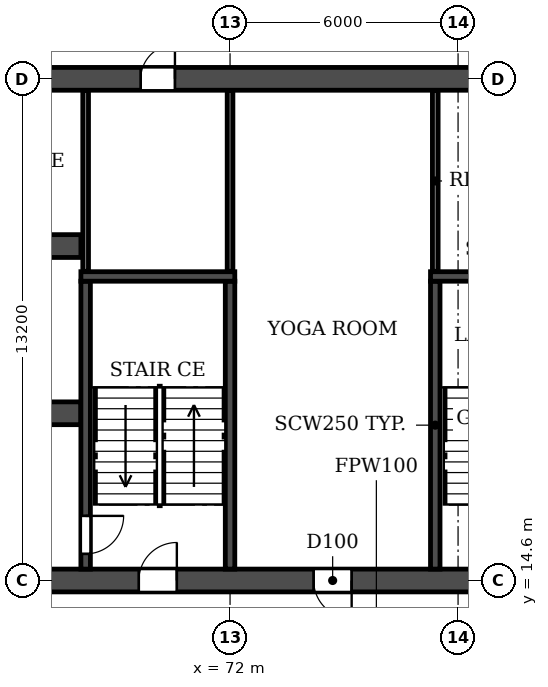
"""IFC4 building model, lengths in metres.
Left out: names, types, materials, properties, quantities, classifications, styles, units other than length and angle.
Written with IfcOpenShell. Run it as: python <this file> out.ifc"""

import sys

from ifc_helpers import new_model, si_unit, direction, frame, frame_2d, origin, place, context, subcontext, project, spatial, rectangle, extrude, element, fill, save


model = new_model("IFC4")
c1 = context("Model", 3, precision=1e-05, world=origin(), true_north=direction((0.0, 1.0)))
c2 = subcontext(c1, "Body", "Model", "MODEL_VIEW")
j1 = project(units=[si_unit("LENGTHUNIT", "METRE"), si_unit("PLANEANGLEUNIT", "RADIAN")], contexts=[c1])
p1 = place(None, origin())
s1 = spatial("IfcSite", under=j1, at=p1, CompositionType="ELEMENT")
p2 = place(p1, origin())
s2 = spatial("IfcBuilding", under=s1, at=p2, CompositionType="ELEMENT")
p3 = place(p2, frame((0.0, 0.0, 49.8)))
s3 = spatial("IfcBuildingStorey", under=s2, at=p3, CompositionType="ELEMENT", Elevation=49.8)
p4 = place(p3, frame((2.6, 14.6, 0.0), z_axis=(0.0, 0.0, 1.0), x_axis=(1.0, 0.0, 0.0)))
e1 = element("IfcWall", 1, at=p4, inside=s3, PredefinedType="SOLIDWALL", context=c2, shape_type="SweptSolid", body=[
    extrude(rectangle(XDim=96.8, YDim=0.6, at=frame_2d((48.4, 0.0))), origin(), (0.0, 0.0, 1.0), 3.0),
])
p5 = place(p4, frame((3.05, 0.0, 0.0)))
e2 = element("IfcOpeningElement", 2, at=p5, cuts=e1, PredefinedType="OPENING", context=c2, shape_type="SweptSolid", body=[
    extrude(rectangle(XDim=1.5, YDim=2.1, at=frame_2d((0.75, 1.05))), frame((0.0, 0.31, 0.0), z_axis=(0.0, -1.0, 0.0), x_axis=(1.0, 0.0, 0.0)), (0.0, 0.0, 1.0), 0.62),
])
p6 = place(p4, frame((10.75, 0.0, 0.0)))
e3 = element("IfcOpeningElement", 3, at=p6, cuts=e1, PredefinedType="OPENING", context=c2, shape_type="SweptSolid", body=[
    extrude(rectangle(XDim=1.5, YDim=2.1, at=frame_2d((0.75, 1.05))), frame((0.0, 0.31, 0.0), z_axis=(0.0, -1.0, 0.0), x_axis=(1.0, 0.0, 0.0)), (0.0, 0.0, 1.0), 0.62),
])
p7 = place(p4, frame((16.3, 0.0, 0.0)))
e4 = element("IfcOpeningElement", 4, at=p7, cuts=e1, PredefinedType="OPENING", context=c2, shape_type="SweptSolid", body=[
    extrude(rectangle(XDim=1.0, YDim=2.1, at=frame_2d((0.5, 1.05))), frame((0.0, 0.31, 0.0), z_axis=(0.0, -1.0, 0.0), x_axis=(1.0, 0.0, 0.0)), (0.0, 0.0, 1.0), 0.62),
])
p8 = place(p4, frame((24.2, 0.0, 0.0)))
e5 = element("IfcOpeningElement", 5, at=p8, cuts=e1, PredefinedType="OPENING", context=c2, shape_type="SweptSolid", body=[
    extrude(rectangle(XDim=1.0, YDim=2.1, at=frame_2d((0.5, 1.05))), frame((0.0, 0.31, 0.0), z_axis=(0.0, -1.0, 0.0), x_axis=(1.0, 0.0, 0.0)), (0.0, 0.0, 1.0), 0.62),
])
p9 = place(p4, frame((28.8, 0.0, 0.0)))
e6 = element("IfcOpeningElement", 6, at=p9, cuts=e1, PredefinedType="OPENING", context=c2, shape_type="SweptSolid", body=[
    extrude(rectangle(XDim=1.0, YDim=2.1, at=frame_2d((0.5, 1.05))), frame((0.0, 0.31, 0.0), z_axis=(0.0, -1.0, 0.0), x_axis=(1.0, 0.0, 0.0)), (0.0, 0.0, 1.0), 0.62),
])
p10 = place(p4, frame((42.7, 0.0, 0.0)))
e7 = element("IfcOpeningElement", 7, at=p10, cuts=e1, PredefinedType="OPENING", context=c2, shape_type="SweptSolid", body=[
    extrude(rectangle(XDim=1.0, YDim=2.1, at=frame_2d((0.5, 1.05))), frame((0.0, 0.31, 0.0), z_axis=(0.0, -1.0, 0.0), x_axis=(1.0, 0.0, 0.0)), (0.0, 0.0, 1.0), 0.62),
])
p11 = place(p4, frame((47.9, 0.0, 0.0)))
e8 = element("IfcOpeningElement", 8, at=p11, cuts=e1, PredefinedType="OPENING", context=c2, shape_type="SweptSolid", body=[
    extrude(rectangle(XDim=1.0, YDim=2.1, at=frame_2d((0.5, 1.05))), frame((0.0, 0.31, 0.0), z_axis=(0.0, -1.0, 0.0), x_axis=(1.0, 0.0, 0.0)), (0.0, 0.0, 1.0), 0.62),
])
p12 = place(p4, frame((51.8, 0.0, 0.0)))
e9 = element("IfcOpeningElement", 9, at=p12, cuts=e1, PredefinedType="OPENING", context=c2, shape_type="SweptSolid", body=[
    extrude(rectangle(XDim=1.0, YDim=2.1, at=frame_2d((0.5, 1.05))), frame((0.0, 0.31, 0.0), z_axis=(0.0, -1.0, 0.0), x_axis=(1.0, 0.0, 0.0)), (0.0, 0.0, 1.0), 0.62),
])
p13 = place(p4, frame((55.7, 0.0, 0.0)))
e10 = element("IfcOpeningElement", 10, at=p13, cuts=e1, PredefinedType="OPENING", context=c2, shape_type="SweptSolid", body=[
    extrude(rectangle(XDim=1.0, YDim=2.1, at=frame_2d((0.5, 1.05))), frame((0.0, 0.31, 0.0), z_axis=(0.0, -1.0, 0.0), x_axis=(1.0, 0.0, 0.0)), (0.0, 0.0, 1.0), 0.62),
])
p14 = place(p4, frame((67.0, 0.0, 0.0)))
e11 = element("IfcOpeningElement", 11, at=p14, cuts=e1, PredefinedType="OPENING", context=c2, shape_type="SweptSolid", body=[
    extrude(rectangle(XDim=1.0, YDim=2.1, at=frame_2d((0.5, 1.05))), frame((0.0, 0.31, 0.0), z_axis=(0.0, -1.0, 0.0), x_axis=(1.0, 0.0, 0.0)), (0.0, 0.0, 1.0), 0.62),
])
p15 = place(p4, frame((71.6, 0.0, 0.0)))
e12 = element("IfcOpeningElement", 12, at=p15, cuts=e1, PredefinedType="OPENING", context=c2, shape_type="SweptSolid", body=[
    extrude(rectangle(XDim=1.0, YDim=2.1, at=frame_2d((0.5, 1.05))), frame((0.0, 0.31, 0.0), z_axis=(0.0, -1.0, 0.0), x_axis=(1.0, 0.0, 0.0)), (0.0, 0.0, 1.0), 0.62),
])
p16 = place(p4, frame((79.5, 0.0, 0.0)))
e13 = element("IfcOpeningElement", 13, at=p16, cuts=e1, PredefinedType="OPENING", context=c2, shape_type="SweptSolid", body=[
    extrude(rectangle(XDim=1.0, YDim=2.1, at=frame_2d((0.5, 1.05))), frame((0.0, 0.31, 0.0), z_axis=(0.0, -1.0, 0.0), x_axis=(1.0, 0.0, 0.0)), (0.0, 0.0, 1.0), 0.62),
])
p17 = place(p4, frame((84.05, 0.0, 0.0)))
e14 = element("IfcOpeningElement", 14, at=p17, cuts=e1, PredefinedType="OPENING", context=c2, shape_type="SweptSolid", body=[
    extrude(rectangle(XDim=1.0, YDim=2.1, at=frame_2d((0.5, 1.05))), frame((0.0, 0.31, 0.0), z_axis=(0.0, -1.0, 0.0), x_axis=(1.0, 0.0, 0.0)), (0.0, 0.0, 1.0), 0.62),
])
p18 = place(p4, frame((91.75, 0.0, 0.0)))
e15 = element("IfcOpeningElement", 15, at=p18, cuts=e1, PredefinedType="OPENING", context=c2, shape_type="SweptSolid", body=[
    extrude(rectangle(XDim=1.0, YDim=2.1, at=frame_2d((0.5, 1.05))), frame((0.0, 0.31, 0.0), z_axis=(0.0, -1.0, 0.0), x_axis=(1.0, 0.0, 0.0)), (0.0, 0.0, 1.0), 0.62),
])
p19 = place(p3, frame((2.6, 27.8, 0.0), z_axis=(0.0, 0.0, 1.0), x_axis=(1.0, 0.0, 0.0)))
e16 = element("IfcWall", 16, at=p19, inside=s3, PredefinedType="SOLIDWALL", context=c2, shape_type="SweptSolid", body=[
    extrude(rectangle(XDim=96.8, YDim=0.6, at=frame_2d((48.4, 0.0))), origin(), (0.0, 0.0, 1.0), 3.0),
])
p20 = place(p19, frame((7.2, 0.0, 0.0)))
e17 = element("IfcOpeningElement", 17, at=p20, cuts=e16, PredefinedType="OPENING", context=c2, shape_type="SweptSolid", body=[
    extrude(rectangle(XDim=1.0, YDim=2.1, at=frame_2d((0.5, 1.05))), frame((0.0, 0.31, 0.0), z_axis=(0.0, -1.0, 0.0), x_axis=(1.0, 0.0, 0.0)), (0.0, 0.0, 1.0), 0.62),
])
p21 = place(p19, frame((16.3, 0.0, 0.0)))
e18 = element("IfcOpeningElement", 18, at=p21, cuts=e16, PredefinedType="OPENING", context=c2, shape_type="SweptSolid", body=[
    extrude(rectangle(XDim=1.0, YDim=2.1, at=frame_2d((0.5, 1.05))), frame((0.0, 0.31, 0.0), z_axis=(0.0, -1.0, 0.0), x_axis=(1.0, 0.0, 0.0)), (0.0, 0.0, 1.0), 0.62),
])
p22 = place(p19, frame((19.65, 0.0, 0.0)))
e19 = element("IfcOpeningElement", 19, at=p22, cuts=e16, PredefinedType="OPENING", context=c2, shape_type="SweptSolid", body=[
    extrude(rectangle(XDim=0.9, YDim=2.1, at=frame_2d((0.45, 1.05))), frame((0.0, 0.31, 0.0), z_axis=(0.0, -1.0, 0.0), x_axis=(1.0, 0.0, 0.0)), (0.0, 0.0, 1.0), 0.62),
])
p23 = place(p19, frame((28.85, 0.0, 0.0)))
e20 = element("IfcOpeningElement", 20, at=p23, cuts=e16, PredefinedType="OPENING", context=c2, shape_type="SweptSolid", body=[
    extrude(rectangle(XDim=0.9, YDim=2.1, at=frame_2d((0.45, 1.05))), frame((0.0, 0.31, 0.0), z_axis=(0.0, -1.0, 0.0), x_axis=(1.0, 0.0, 0.0)), (0.0, 0.0, 1.0), 0.62),
])
p24 = place(p19, frame((33.3, 0.0, 0.0)))
e21 = element("IfcOpeningElement", 21, at=p24, cuts=e16, PredefinedType="OPENING", context=c2, shape_type="SweptSolid", body=[
    extrude(rectangle(XDim=1.0, YDim=2.1, at=frame_2d((0.5, 1.05))), frame((0.0, 0.31, 0.0), z_axis=(0.0, -1.0, 0.0), x_axis=(1.0, 0.0, 0.0)), (0.0, 0.0, 1.0), 0.62),
])
p25 = place(p19, frame((38.25, 0.0, 0.0)))
e22 = element("IfcOpeningElement", 22, at=p25, cuts=e16, PredefinedType="OPENING", context=c2, shape_type="SweptSolid", body=[
    extrude(rectangle(XDim=1.5, YDim=2.1, at=frame_2d((0.75, 1.05))), frame((0.0, 0.31, 0.0), z_axis=(0.0, -1.0, 0.0), x_axis=(1.0, 0.0, 0.0)), (0.0, 0.0, 1.0), 0.62),
])
p26 = place(p19, frame((45.0, 0.0, 0.0)))
e23 = element("IfcOpeningElement", 23, at=p26, cuts=e16, PredefinedType="OPENING", context=c2, shape_type="SweptSolid", body=[
    extrude(rectangle(XDim=1.0, YDim=2.1, at=frame_2d((0.5, 1.05))), frame((0.0, 0.31, 0.0), z_axis=(0.0, -1.0, 0.0), x_axis=(1.0, 0.0, 0.0)), (0.0, 0.0, 1.0), 0.62),
])
p27 = place(p19, frame((47.9, 0.0, 0.0)))
e24 = element("IfcOpeningElement", 24, at=p27, cuts=e16, PredefinedType="OPENING", context=c2, shape_type="SweptSolid", body=[
    extrude(rectangle(XDim=1.0, YDim=2.1, at=frame_2d((0.5, 1.05))), frame((0.0, 0.31, 0.0), z_axis=(0.0, -1.0, 0.0), x_axis=(1.0, 0.0, 0.0)), (0.0, 0.0, 1.0), 0.62),
])
p28 = place(p19, frame((52.1, 0.0, 0.0)))
e25 = element("IfcOpeningElement", 25, at=p28, cuts=e16, PredefinedType="OPENING", context=c2, shape_type="SweptSolid", body=[
    extrude(rectangle(XDim=1.0, YDim=2.1, at=frame_2d((0.5, 1.05))), frame((0.0, 0.31, 0.0), z_axis=(0.0, -1.0, 0.0), x_axis=(1.0, 0.0, 0.0)), (0.0, 0.0, 1.0), 0.62),
])
p29 = place(p19, frame((56.0, 0.0, 0.0)))
e26 = element("IfcOpeningElement", 26, at=p29, cuts=e16, PredefinedType="OPENING", context=c2, shape_type="SweptSolid", body=[
    extrude(rectangle(XDim=1.0, YDim=2.1, at=frame_2d((0.5, 1.05))), frame((0.0, 0.31, 0.0), z_axis=(0.0, -1.0, 0.0), x_axis=(1.0, 0.0, 0.0)), (0.0, 0.0, 1.0), 0.62),
])
p30 = place(p19, frame((61.2, 0.0, 0.0)))
e27 = element("IfcOpeningElement", 27, at=p30, cuts=e16, PredefinedType="OPENING", context=c2, shape_type="SweptSolid", body=[
    extrude(rectangle(XDim=1.0, YDim=2.1, at=frame_2d((0.5, 1.05))), frame((0.0, 0.31, 0.0), z_axis=(0.0, -1.0, 0.0), x_axis=(1.0, 0.0, 0.0)), (0.0, 0.0, 1.0), 0.62),
])
p31 = place(p19, frame((67.05, 0.0, 0.0)))
e28 = element("IfcOpeningElement", 28, at=p31, cuts=e16, PredefinedType="OPENING", context=c2, shape_type="SweptSolid", body=[
    extrude(rectangle(XDim=0.9, YDim=2.1, at=frame_2d((0.45, 1.05))), frame((0.0, 0.31, 0.0), z_axis=(0.0, -1.0, 0.0), x_axis=(1.0, 0.0, 0.0)), (0.0, 0.0, 1.0), 0.62),
])
p32 = place(p19, frame((76.25, 0.0, 0.0)))
e29 = element("IfcOpeningElement", 29, at=p32, cuts=e16, PredefinedType="OPENING", context=c2, shape_type="SweptSolid", body=[
    extrude(rectangle(XDim=0.9, YDim=2.1, at=frame_2d((0.45, 1.05))), frame((0.0, 0.31, 0.0), z_axis=(0.0, -1.0, 0.0), x_axis=(1.0, 0.0, 0.0)), (0.0, 0.0, 1.0), 0.62),
])
p33 = place(p19, frame((79.5, 0.0, 0.0)))
e30 = element("IfcOpeningElement", 30, at=p33, cuts=e16, PredefinedType="OPENING", context=c2, shape_type="SweptSolid", body=[
    extrude(rectangle(XDim=1.0, YDim=2.1, at=frame_2d((0.5, 1.05))), frame((0.0, 0.31, 0.0), z_axis=(0.0, -1.0, 0.0), x_axis=(1.0, 0.0, 0.0)), (0.0, 0.0, 1.0), 0.62),
])
p34 = place(p19, frame((84.05, 0.0, 0.0)))
e31 = element("IfcOpeningElement", 31, at=p34, cuts=e16, PredefinedType="OPENING", context=c2, shape_type="SweptSolid", body=[
    extrude(rectangle(XDim=1.0, YDim=2.1, at=frame_2d((0.5, 1.05))), frame((0.0, 0.31, 0.0), z_axis=(0.0, -1.0, 0.0), x_axis=(1.0, 0.0, 0.0)), (0.0, 0.0, 1.0), 0.62),
])
p35 = place(p19, frame((91.75, 0.0, 0.0)))
e32 = element("IfcOpeningElement", 32, at=p35, cuts=e16, PredefinedType="OPENING", context=c2, shape_type="SweptSolid", body=[
    extrude(rectangle(XDim=1.0, YDim=2.1, at=frame_2d((0.5, 1.05))), frame((0.0, 0.31, 0.0), z_axis=(0.0, -1.0, 0.0), x_axis=(1.0, 0.0, 0.0)), (0.0, 0.0, 1.0), 0.62),
])
p36 = place(p3, frame((33.925, 19.0, 0.0), z_axis=(0.0, 0.0, 1.0), x_axis=(1.0, 0.0, 0.0)))
e33 = element("IfcWall", 33, at=p36, inside=s3, PredefinedType="SOLIDWALL", context=c2, shape_type="SweptSolid", body=[
    extrude(rectangle(XDim=34.15, YDim=0.6, at=frame_2d((17.075, 0.0))), origin(), (0.0, 0.0, 1.0), 3.0),
])
p37 = place(p36, frame((16.175, 0.0, 0.0)))
e34 = element("IfcOpeningElement", 34, at=p37, cuts=e33, PredefinedType="OPENING", context=c2, shape_type="SweptSolid", body=[
    extrude(rectangle(XDim=1.8, YDim=2.1, at=frame_2d((0.9, 1.05))), frame((0.0, 0.31, 0.0), z_axis=(0.0, -1.0, 0.0), x_axis=(1.0, 0.0, 0.0)), (0.0, 0.0, 1.0), 0.62),
])
p38 = place(p36, frame((1.525, 0.0, 0.0)))
e35 = element("IfcOpeningElement", 35, at=p38, cuts=e33, PredefinedType="OPENING", context=c2, shape_type="SweptSolid", body=[
    extrude(rectangle(XDim=1.8, YDim=2.1, at=frame_2d((0.9, 1.05))), frame((0.0, 0.31, 0.0), z_axis=(0.0, -1.0, 0.0), x_axis=(1.0, 0.0, 0.0)), (0.0, 0.0, 1.0), 0.62),
])
p39 = place(p36, frame((8.725, 0.0, 0.0)))
e36 = element("IfcOpeningElement", 36, at=p39, cuts=e33, PredefinedType="OPENING", context=c2, shape_type="SweptSolid", body=[
    extrude(rectangle(XDim=1.1, YDim=2.1, at=frame_2d((0.55, 1.05))), frame((0.0, 0.31, 0.0), z_axis=(0.0, -1.0, 0.0), x_axis=(1.0, 0.0, 0.0)), (0.0, 0.0, 1.0), 0.62),
])
p40 = place(p36, frame((11.325, 0.0, 0.0)))
e37 = element("IfcOpeningElement", 37, at=p40, cuts=e33, PredefinedType="OPENING", context=c2, shape_type="SweptSolid", body=[
    extrude(rectangle(XDim=1.1, YDim=2.1, at=frame_2d((0.55, 1.05))), frame((0.0, 0.31, 0.0), z_axis=(0.0, -1.0, 0.0), x_axis=(1.0, 0.0, 0.0)), (0.0, 0.0, 1.0), 0.62),
])
p41 = place(p36, frame((13.925, 0.0, 0.0)))
e38 = element("IfcOpeningElement", 38, at=p41, cuts=e33, PredefinedType="OPENING", context=c2, shape_type="SweptSolid", body=[
    extrude(rectangle(XDim=1.1, YDim=2.1, at=frame_2d((0.55, 1.05))), frame((0.0, 0.31, 0.0), z_axis=(0.0, -1.0, 0.0), x_axis=(1.0, 0.0, 0.0)), (0.0, 0.0, 1.0), 0.62),
])
p42 = place(p36, frame((19.125, 0.0, 0.0)))
e39 = element("IfcOpeningElement", 39, at=p42, cuts=e33, PredefinedType="OPENING", context=c2, shape_type="SweptSolid", body=[
    extrude(rectangle(XDim=1.1, YDim=2.1, at=frame_2d((0.55, 1.05))), frame((0.0, 0.31, 0.0), z_axis=(0.0, -1.0, 0.0), x_axis=(1.0, 0.0, 0.0)), (0.0, 0.0, 1.0), 0.62),
])
p43 = place(p36, frame((21.725, 0.0, 0.0)))
e40 = element("IfcOpeningElement", 40, at=p43, cuts=e33, PredefinedType="OPENING", context=c2, shape_type="SweptSolid", body=[
    extrude(rectangle(XDim=1.1, YDim=2.1, at=frame_2d((0.55, 1.05))), frame((0.0, 0.31, 0.0), z_axis=(0.0, -1.0, 0.0), x_axis=(1.0, 0.0, 0.0)), (0.0, 0.0, 1.0), 0.62),
])
p44 = place(p36, frame((24.325, 0.0, 0.0)))
e41 = element("IfcOpeningElement", 41, at=p44, cuts=e33, PredefinedType="OPENING", context=c2, shape_type="SweptSolid", body=[
    extrude(rectangle(XDim=1.1, YDim=2.1, at=frame_2d((0.55, 1.05))), frame((0.0, 0.31, 0.0), z_axis=(0.0, -1.0, 0.0), x_axis=(1.0, 0.0, 0.0)), (0.0, 0.0, 1.0), 0.62),
])
p45 = place(p36, frame((30.825, 0.0, 0.0)))
e42 = element("IfcOpeningElement", 42, at=p45, cuts=e33, PredefinedType="OPENING", context=c2, shape_type="SweptSolid", body=[
    extrude(rectangle(XDim=1.8, YDim=2.1, at=frame_2d((0.9, 1.05))), frame((0.0, 0.31, 0.0), z_axis=(0.0, -1.0, 0.0), x_axis=(1.0, 0.0, 0.0)), (0.0, 0.0, 1.0), 0.62),
])
p46 = place(p3, frame((33.925, 23.4, 0.0), z_axis=(0.0, 0.0, 1.0), x_axis=(1.0, 0.0, 0.0)))
e43 = element("IfcWall", 43, at=p46, inside=s3, PredefinedType="SOLIDWALL", context=c2, shape_type="SweptSolid", body=[
    extrude(rectangle(XDim=34.15, YDim=0.6, at=frame_2d((17.075, 0.0))), origin(), (0.0, 0.0, 1.0), 3.0),
])
p47 = place(p46, frame((16.175, 0.0, 0.0)))
e44 = element("IfcOpeningElement", 44, at=p47, cuts=e43, PredefinedType="OPENING", context=c2, shape_type="SweptSolid", body=[
    extrude(rectangle(XDim=1.8, YDim=2.1, at=frame_2d((0.9, 1.05))), frame((0.0, 0.31, 0.0), z_axis=(0.0, -1.0, 0.0), x_axis=(1.0, 0.0, 0.0)), (0.0, 0.0, 1.0), 0.62),
])
p48 = place(p46, frame((11.025, 0.0, 0.0)))
e45 = element("IfcOpeningElement", 45, at=p48, cuts=e43, PredefinedType="OPENING", context=c2, shape_type="SweptSolid", body=[
    extrude(rectangle(XDim=1.1, YDim=2.1, at=frame_2d((0.55, 1.05))), frame((0.0, 0.31, 0.0), z_axis=(0.0, -1.0, 0.0), x_axis=(1.0, 0.0, 0.0)), (0.0, 0.0, 1.0), 0.62),
])
p49 = place(p3, frame((68.2, 14.9, 0.0), z_axis=(0.0, 0.0, 1.0), x_axis=(0.0, 1.0, 0.0)))
e46 = element("IfcWall", 46, at=p49, inside=s3, PredefinedType="SOLIDWALL", context=c2, shape_type="SweptSolid", body=[
    extrude(rectangle(XDim=7.575, YDim=0.25, at=frame_2d((3.788, 0.0))), origin(), (0.0, 0.0, 1.0), 3.0),
])
p50 = place(p49, frame((0.4, 0.0, 0.0)))
e47 = element("IfcOpeningElement", 47, at=p50, cuts=e46, PredefinedType="OPENING", context=c2, shape_type="SweptSolid", body=[
    extrude(rectangle(XDim=1.0, YDim=2.1, at=frame_2d((0.5, 1.05))), frame((0.0, 0.135, 0.0), z_axis=(0.0, -1.0, 0.0), x_axis=(1.0, 0.0, 0.0)), (0.0, 0.0, 1.0), 0.27),
])
p51 = place(p3, frame((72.0, 14.9, 0.0), z_axis=(0.0, 0.0, 1.0), x_axis=(0.0, 1.0, 0.0)))
e48 = element("IfcWall", 48, at=p51, inside=s3, PredefinedType="SOLIDWALL", context=c2, shape_type="SweptSolid", body=[
    extrude(rectangle(XDim=7.575, YDim=0.25, at=frame_2d((3.788, 0.0))), origin(), (0.0, 0.0, 1.0), 3.0),
])
p52 = place(p3, frame((68.075, 22.6, 0.0), z_axis=(0.0, 0.0, 1.0), x_axis=(1.0, 0.0, 0.0)))
e49 = element("IfcWall", 49, at=p52, inside=s3, PredefinedType="SOLIDWALL", context=c2, shape_type="SweptSolid", body=[
    extrude(rectangle(XDim=4.05, YDim=0.25, at=frame_2d((2.025, 0.0))), origin(), (0.0, 0.0, 1.0), 3.0),
])
p53 = place(p3, frame((77.4, 14.9, 0.0), z_axis=(0.0, 0.0, 1.0), x_axis=(0.0, 1.0, 0.0)))
e50 = element("IfcWall", 50, at=p53, inside=s3, PredefinedType="SOLIDWALL", context=c2, shape_type="SweptSolid", body=[
    extrude(rectangle(XDim=7.575, YDim=0.25, at=frame_2d((3.788, 0.0))), origin(), (0.0, 0.0, 1.0), 3.0),
])
p54 = place(p3, frame((77.275, 22.6, 0.0), z_axis=(0.0, 0.0, 1.0), x_axis=(1.0, 0.0, 0.0)))
e51 = element("IfcWall", 51, at=p54, inside=s3, PredefinedType="SOLIDWALL", context=c2, shape_type="SweptSolid", body=[
    extrude(rectangle(XDim=4.05, YDim=0.25, at=frame_2d((2.025, 0.0))), origin(), (0.0, 0.0, 1.0), 3.0),
])
for number, where, z_axis, x_axis in (
    (52, (68.2, 22.735, 0.0), (0.0, 0.0, 1.0), (0.0, 1.0, 0.0)),
    (53, (72.0, 22.735, 0.0), (0.0, 0.0, 1.0), (0.0, 1.0, 0.0)),
    (54, (77.4, 22.735, 0.0), (0.0, 0.0, 1.0), (0.0, 1.0, 0.0)),
):
    element("IfcWall", number, at=place(p3, frame(where, z_axis=z_axis, x_axis=x_axis)), inside=s3, PredefinedType="PARTITIONING", context=c2, shape_type="SweptSolid", body=[
        extrude(rectangle(XDim=4.755, YDim=0.15, at=frame_2d((2.377, 0.0))), origin(), (0.0, 0.0, 1.0), 3.0),
    ])
p55 = place(p31, origin())
e55 = element("IfcDoor", 55, at=p55, inside=s3, OperationType="SINGLE_SWING_RIGHT", PredefinedType="DOOR", context=c2, shape_type="SweptSolid", body=[
    extrude(rectangle(XDim=0.9, YDim=2.1, at=frame_2d((0.45, 1.05))), frame((0.0, 0.025, 0.0), z_axis=(0.0, -1.0, 0.0), x_axis=(1.0, 0.0, 0.0)), (0.0, 0.0, 1.0), 0.05),
])
fill(e28, e55)
p56 = place(p14, origin())
e56 = element("IfcDoor", 56, at=p56, inside=s3, OperationType="SINGLE_SWING_RIGHT", PredefinedType="DOOR", context=c2, shape_type="SweptSolid", body=[
    extrude(rectangle(XDim=1.0, YDim=2.1, at=frame_2d((0.5, 1.05))), frame((0.0, 0.025, 0.0), z_axis=(0.0, -1.0, 0.0), x_axis=(1.0, 0.0, 0.0)), (0.0, 0.0, 1.0), 0.05),
])
fill(e11, e56)
p57 = place(p15, frame((1.0, 0.0, 0.0), z_axis=(0.0, 0.0, 1.0), x_axis=(-1.0, 0.0, 0.0)))
e57 = element("IfcDoor", 57, at=p57, inside=s3, OperationType="SINGLE_SWING_LEFT", PredefinedType="DOOR", context=c2, shape_type="SweptSolid", body=[
    extrude(rectangle(XDim=1.0, YDim=2.1, at=frame_2d((0.5, 1.05))), frame((0.0, 0.025, 0.0), z_axis=(0.0, -1.0, 0.0), x_axis=(1.0, 0.0, 0.0)), (0.0, 0.0, 1.0), 0.05),
])
fill(e12, e57)
p58 = place(p50, frame((1.0, 0.0, 0.0), z_axis=(0.0, 0.0, 1.0), x_axis=(-1.0, 0.0, 0.0)))
e58 = element("IfcDoor", 58, at=p58, inside=s3, OperationType="SINGLE_SWING_LEFT", PredefinedType="DOOR", context=c2, shape_type="SweptSolid", body=[
    extrude(rectangle(XDim=1.0, YDim=2.1, at=frame_2d((0.5, 1.05))), frame((0.0, 0.025, 0.0), z_axis=(0.0, -1.0, 0.0), x_axis=(1.0, 0.0, 0.0)), (0.0, 0.0, 1.0), 0.05),
])
fill(e47, e58)
save(model, sys.argv[1])
